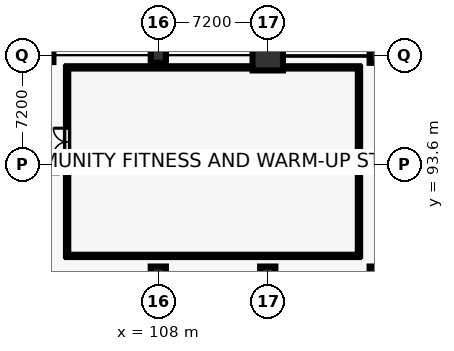
"""IFC4 building model, lengths in metres.
Left out: names, types, materials, properties, quantities, classifications, styles, units other than length and angle.
Written with IfcOpenShell. Run it as: python <this file> out.ifc"""

import sys

from ifc_helpers import new_model, si_unit, direction, frame, frame_2d, origin, origin_2d, place, context, subcontext, project, spatial, rectangle, circle, extrude, element, fill, save


model = new_model("IFC4")
c1 = context("Model", 3, precision=1e-05, world=origin(), true_north=direction((0.0, 1.0)))
c2 = subcontext(c1, "Body", "Model", "MODEL_VIEW")
j1 = project(units=[si_unit("LENGTHUNIT", "METRE"), si_unit("PLANEANGLEUNIT", "RADIAN")], contexts=[c1])
p1 = place(None, origin())
s1 = spatial("IfcSite", under=j1, at=p1, CompositionType="ELEMENT")
p2 = place(p1, origin())
s2 = spatial("IfcBuilding", under=s1, at=p2, CompositionType="ELEMENT")
p3 = place(p2, origin())
s3 = spatial("IfcBuildingStorey", under=s2, at=p3, CompositionType="ELEMENT", Elevation=0.0)
p4 = place(p3, frame((100.8, 93.6, 0.0), z_axis=(0.0, 0.0, 1.0), x_axis=(1.0, 0.0, 0.0)))
e1 = element("IfcColumn", 1, at=p4, inside=s3, PredefinedType="COLUMN", context=c2, shape_type="SweptSolid", body=[
    extrude(circle(Radius=0.5, at=origin_2d()), origin(), (0.0, 0.0, 1.0), 5.4),
])
p5 = place(p3, frame((100.8, 100.8, 0.0), z_axis=(0.0, 0.0, 1.0), x_axis=(1.0, 0.0, 0.0)))
e2 = element("IfcColumn", 2, at=p5, inside=s3, PredefinedType="COLUMN", context=c2, shape_type="SweptSolid", body=[
    extrude(rectangle(XDim=0.6, YDim=0.9, at=origin_2d()), origin(), (0.0, 0.0, 1.0), 5.4),
])
p6 = place(p3, frame((108.0, 86.4, 0.0), z_axis=(0.0, 0.0, 1.0), x_axis=(1.0, 0.0, 0.0)))
e3 = element("IfcColumn", 3, at=p6, inside=s3, PredefinedType="COLUMN", context=c2, shape_type="SweptSolid", body=[
    extrude(rectangle(XDim=1.0, YDim=1.0, at=origin_2d()), origin(), (0.0, 0.0, 1.0), 5.4),
])
p7 = place(p3, frame((108.0, 93.6, 0.0), z_axis=(0.0, 0.0, 1.0), x_axis=(1.0, 0.0, 0.0)))
e4 = element("IfcColumn", 4, at=p7, inside=s3, PredefinedType="COLUMN", context=c2, shape_type="SweptSolid", body=[
    extrude(rectangle(XDim=0.9, YDim=0.9, at=origin_2d()), origin(), (0.0, 0.0, 1.0), 5.4),
])
for number, where, z_axis, x_axis in (
    (5, (108.0, 100.8, 0.0), (0.0, 0.0, 1.0), (1.0, 0.0, 0.0)),
    (6, (115.2, 86.4, 0.0), (0.0, 0.0, 1.0), (1.0, 0.0, 0.0)),
):
    element("IfcColumn", number, at=place(p3, frame(where, z_axis=z_axis, x_axis=x_axis)), inside=s3, PredefinedType="COLUMN", context=c2, shape_type="SweptSolid", body=[
        extrude(circle(Radius=0.5, at=origin_2d()), origin(), (0.0, 0.0, 1.0), 5.4),
    ])
p8 = place(p3, frame((115.2, 93.6, 0.0), z_axis=(0.0, 0.0, 1.0), x_axis=(1.0, 0.0, 0.0)))
e7 = element("IfcColumn", 7, at=p8, inside=s3, PredefinedType="COLUMN", context=c2, shape_type="SweptSolid", body=[
    extrude(rectangle(XDim=0.6, YDim=0.9, at=origin_2d()), origin(), (0.0, 0.0, 1.0), 5.4),
])
p9 = place(p3, frame((115.2, 100.8, 0.0), z_axis=(0.0, 0.0, 1.0), x_axis=(1.0, 0.0, 0.0)))
e8 = element("IfcColumn", 8, at=p9, inside=s3, PredefinedType="COLUMN", context=c2, shape_type="SweptSolid", body=[
    extrude(circle(Radius=1.0, at=origin_2d()), origin(), (0.0, 0.0, 1.0), 5.4),
])
p10 = place(p3, frame((122.4, 86.4, 0.0), z_axis=(0.0, 0.0, 1.0), x_axis=(1.0, 0.0, 0.0)))
e9 = element("IfcColumn", 9, at=p10, inside=s3, PredefinedType="COLUMN", context=c2, shape_type="SweptSolid", body=[
    extrude(circle(Radius=0.5, at=origin_2d()), origin(), (0.0, 0.0, 1.0), 5.4),
])
p11 = place(p3, frame((122.4, 93.6, 0.0), z_axis=(0.0, 0.0, 1.0), x_axis=(1.0, 0.0, 0.0)))
e10 = element("IfcColumn", 10, at=p11, inside=s3, PredefinedType="COLUMN", context=c2, shape_type="SweptSolid", body=[
    extrude(rectangle(XDim=0.6, YDim=0.9, at=origin_2d()), origin(), (0.0, 0.0, 1.0), 5.4),
])
p12 = place(p3, frame((122.4, 100.8, 0.0), z_axis=(0.0, 0.0, 1.0), x_axis=(1.0, 0.0, 0.0)))
e11 = element("IfcColumn", 11, at=p12, inside=s3, PredefinedType="COLUMN", context=c2, shape_type="SweptSolid", body=[
    extrude(rectangle(XDim=1.0, YDim=1.0, at=origin_2d()), origin(), (0.0, 0.0, 1.0), 5.4),
])
p13 = place(p3, frame((102.0, 87.6, 0.0), z_axis=(0.0, 0.0, 1.0), x_axis=(1.0, 0.0, 0.0)))
e12 = element("IfcWall", 12, at=p13, inside=s3, PredefinedType="PARTITIONING", context=c2, shape_type="SweptSolid", body=[
    extrude(rectangle(XDim=19.2, YDim=0.15, at=frame_2d((9.6, 0.0))), origin(), (0.0, 0.0, 1.0), 4.1),
])
p14 = place(p3, frame((121.2, 87.6, 0.0), z_axis=(0.0, 0.0, 1.0), x_axis=(0.0, 1.0, 0.0)))
e13 = element("IfcWall", 13, at=p14, inside=s3, PredefinedType="PARTITIONING", context=c2, shape_type="SweptSolid", body=[
    extrude(rectangle(XDim=12.4, YDim=0.15, at=frame_2d((6.2, 0.0))), origin(), (0.0, 0.0, 1.0), 4.1),
])
p15 = place(p3, frame((121.2, 100.0, 0.0), z_axis=(0.0, 0.0, 1.0), x_axis=(-1.0, 0.0, 0.0)))
e14 = element("IfcWall", 14, at=p15, inside=s3, PredefinedType="PARTITIONING", context=c2, shape_type="SweptSolid", body=[
    extrude(rectangle(XDim=19.2, YDim=0.15, at=frame_2d((9.6, 0.0))), origin(), (0.0, 0.0, 1.0), 4.1),
])
p16 = place(p3, frame((102.0, 100.0, 0.0), z_axis=(0.0, 0.0, 1.0), x_axis=(0.0, -1.0, 0.0)))
e15 = element("IfcWall", 15, at=p16, inside=s3, PredefinedType="PARTITIONING", context=c2, shape_type="SweptSolid", body=[
    extrude(rectangle(XDim=12.4, YDim=0.15, at=frame_2d((6.2, 0.0))), origin(), (0.0, 0.0, 1.0), 4.1),
])
p17 = place(p16, frame((4.0, 0.0, 0.0)))
e16 = element("IfcOpeningElement", 16, at=p17, cuts=e15, PredefinedType="OPENING", context=c2, shape_type="SweptSolid", body=[
    extrude(rectangle(XDim=1.8, YDim=2.3, at=frame_2d((0.9, 1.15))), frame((0.0, 0.085, 0.0), z_axis=(0.0, -1.0, 0.0), x_axis=(1.0, 0.0, 0.0)), (0.0, 0.0, 1.0), 0.17),
])
p18 = place(p17, frame((1.8, 0.0, 0.0), z_axis=(0.0, 0.0, 1.0), x_axis=(-1.0, 0.0, 0.0)))
e17 = element("IfcDoor", 17, at=p18, inside=s3, OperationType="DOUBLE_DOOR_SINGLE_SWING", PredefinedType="DOOR", context=c2, shape_type="SweptSolid", body=[
    extrude(rectangle(XDim=1.8, YDim=2.3, at=frame_2d((0.9, 1.15))), frame((0.0, 0.025, 0.0), z_axis=(0.0, -1.0, 0.0), x_axis=(1.0, 0.0, 0.0)), (0.0, 0.0, 1.0), 0.05),
])
fill(e16, e17)
save(model, sys.argv[1])
